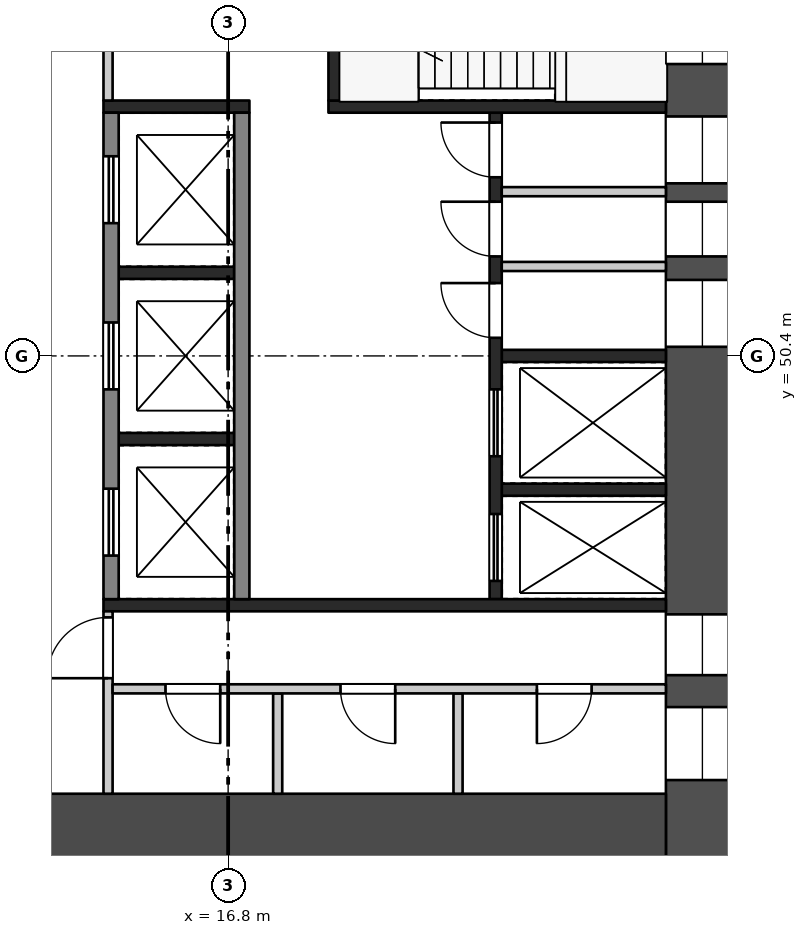
"""IFC4 building model, lengths in metres.
Left out: names, types, materials, properties, quantities, classifications, styles, units other than length and angle.
Written with IfcOpenShell. Run it as: python <this file> out.ifc"""

import sys

from ifc_helpers import new_model, si_unit, direction, frame, frame_2d, origin, place, context, subcontext, project, spatial, rectangle, extrude, element, fill, save


model = new_model("IFC4")
c1 = context("Model", 3, precision=1e-05, world=origin(), true_north=direction((0.0, 1.0)))
c2 = subcontext(c1, "Body", "Model", "MODEL_VIEW")
j1 = project(units=[si_unit("LENGTHUNIT", "METRE"), si_unit("PLANEANGLEUNIT", "RADIAN")], contexts=[c1])
p1 = place(None, origin())
s1 = spatial("IfcSite", under=j1, at=p1, CompositionType="ELEMENT")
p2 = place(p1, origin())
s2 = spatial("IfcBuilding", under=s1, at=p2, CompositionType="ELEMENT")
p3 = place(p2, frame((0.0, 0.0, 140.7)))
s3 = spatial("IfcBuildingStorey", under=s2, at=p3, CompositionType="ELEMENT", Elevation=140.7)
p4 = place(p3, frame((24.6, 58.8, 0.0), z_axis=(0.0, 0.0, 1.0), x_axis=(0.0, -1.0, 0.0)))
e1 = element("IfcWall", 1, at=p4, inside=s3, PredefinedType="SHEAR", context=c2, shape_type="SweptSolid", body=[
    extrude(rectangle(XDim=16.8, YDim=1.2, at=frame_2d((8.4, 0.0))), origin(), (0.0, 0.0, 1.0), 6.72),
])
p5 = place(p4, frame((1.8, 0.0, 0.5)))
e2 = element("IfcOpeningElement", 2, at=p5, cuts=e1, PredefinedType="OPENING", context=c2, shape_type="SweptSolid", body=[
    extrude(rectangle(XDim=1.8, YDim=2.4, at=frame_2d((0.9, 1.2))), frame((0.0, 0.61, 0.0), z_axis=(0.0, -1.0, 0.0), x_axis=(1.0, 0.0, 0.0)), (0.0, 0.0, 1.0), 1.22),
])
p6 = place(p4, frame((4.462, 0.0, 1.6)))
e3 = element("IfcOpeningElement", 3, at=p6, cuts=e1, PredefinedType="OPENING", context=c2, shape_type="SweptSolid", body=[
    extrude(rectangle(XDim=1.1, YDim=1.2, at=frame_2d((0.55, 0.6))), frame((0.0, 0.61, 0.0), z_axis=(0.0, -1.0, 0.0), x_axis=(1.0, 0.0, 0.0)), (0.0, 0.0, 1.0), 1.22),
])
p7 = place(p4, frame((5.864, 0.0, 1.6)))
e4 = element("IfcOpeningElement", 4, at=p7, cuts=e1, PredefinedType="OPENING", context=c2, shape_type="SweptSolid", body=[
    extrude(rectangle(XDim=0.9, YDim=1.2, at=frame_2d((0.45, 0.6))), frame((0.0, 0.61, 0.0), z_axis=(0.0, -1.0, 0.0), x_axis=(1.0, 0.0, 0.0)), (0.0, 0.0, 1.0), 1.22),
])
p8 = place(p4, frame((7.15, 0.0, 1.6)))
e5 = element("IfcOpeningElement", 5, at=p8, cuts=e1, PredefinedType="OPENING", context=c2, shape_type="SweptSolid", body=[
    extrude(rectangle(XDim=1.1, YDim=1.2, at=frame_2d((0.55, 0.6))), frame((0.0, 0.61, 0.0), z_axis=(0.0, -1.0, 0.0), x_axis=(1.0, 0.0, 0.0)), (0.0, 0.0, 1.0), 1.22),
])
p9 = place(p4, frame((12.65, 0.0, 0.6)))
e6 = element("IfcOpeningElement", 6, at=p9, cuts=e1, PredefinedType="OPENING", context=c2, shape_type="SweptSolid", body=[
    extrude(rectangle(XDim=1.0, YDim=2.1, at=frame_2d((0.5, 1.05))), frame((0.0, 0.61, 0.0), z_axis=(0.0, -1.0, 0.0), x_axis=(1.0, 0.0, 0.0)), (0.0, 0.0, 1.0), 1.22),
])
p10 = place(p4, frame((14.175, 0.0, 1.6)))
e7 = element("IfcOpeningElement", 7, at=p10, cuts=e1, PredefinedType="OPENING", context=c2, shape_type="SweptSolid", body=[
    extrude(rectangle(XDim=1.2, YDim=1.2, at=frame_2d((0.6, 0.6))), frame((0.0, 0.61, 0.0), z_axis=(0.0, -1.0, 0.0), x_axis=(1.0, 0.0, 0.0)), (0.0, 0.0, 1.0), 1.22),
])
p11 = place(p3, frame((9.6, 42.6, 0.0), z_axis=(0.0, 0.0, 1.0), x_axis=(1.0, 0.0, 0.0)))
e8 = element("IfcWall", 8, at=p11, inside=s3, PredefinedType="SHEAR", context=c2, shape_type="SweptSolid", body=[
    extrude(rectangle(XDim=14.4, YDim=1.2, at=frame_2d((7.2, 0.0))), origin(), (0.0, 0.0, 1.0), 6.72),
])
p12 = place(p11, frame((2.1, 0.0, 0.0)))
e9 = element("IfcOpeningElement", 9, at=p12, cuts=e8, PredefinedType="OPENING", context=c2, shape_type="SweptSolid", body=[
    extrude(rectangle(XDim=1.8, YDim=2.1, at=frame_2d((0.9, 1.05))), frame((0.0, 0.61, 0.0), z_axis=(0.0, -1.0, 0.0), x_axis=(1.0, 0.0, 0.0)), (0.0, 0.0, 1.0), 1.22),
])
for number, where, z_axis, x_axis in (
    (10, (15.0, 51.767, 0.0), (0.0, 0.0, 1.0), (1.0, 0.0, 0.0)),
    (11, (15.0, 49.033, 0.0), (0.0, 0.0, 1.0), (1.0, 0.0, 0.0)),
):
    element("IfcWall", number, at=place(p3, frame(where, z_axis=z_axis, x_axis=x_axis)), inside=s3, PredefinedType="SHEAR", context=c2, shape_type="SweptSolid", body=[
        extrude(rectangle(XDim=1.9, YDim=0.2, at=frame_2d((0.95, 0.0))), origin(), (0.0, 0.0, 1.0), 6.72),
    ])
p13 = place(p3, frame((14.875, 54.4, 0.0), z_axis=(0.0, 0.0, 1.0), x_axis=(0.0, -1.0, 0.0)))
e12 = element("IfcWall", 12, at=p13, inside=s3, PredefinedType="SHEAR", context=c2, shape_type="SweptSolid", body=[
    extrude(rectangle(XDim=8.0, YDim=0.25, at=frame_2d((4.0, 0.0))), origin(), (0.0, 0.0, 1.0), 6.72),
])
p14 = place(p13, frame((0.717, 0.0, 0.0)))
e13 = element("IfcOpeningElement", 13, at=p14, cuts=e12, PredefinedType="OPENING", context=c2, shape_type="SweptSolid", body=[
    extrude(rectangle(XDim=1.1, YDim=2.1, at=frame_2d((0.55, 1.05))), frame((0.0, 0.135, 0.0), z_axis=(0.0, -1.0, 0.0), x_axis=(1.0, 0.0, 0.0)), (0.0, 0.0, 1.0), 0.27),
])
p15 = place(p13, frame((3.45, 0.0, 0.0)))
e14 = element("IfcOpeningElement", 14, at=p15, cuts=e12, PredefinedType="OPENING", context=c2, shape_type="SweptSolid", body=[
    extrude(rectangle(XDim=1.1, YDim=2.1, at=frame_2d((0.55, 1.05))), frame((0.0, 0.135, 0.0), z_axis=(0.0, -1.0, 0.0), x_axis=(1.0, 0.0, 0.0)), (0.0, 0.0, 1.0), 0.27),
])
p16 = place(p13, frame((6.183, 0.0, 0.0)))
e15 = element("IfcOpeningElement", 15, at=p16, cuts=e12, PredefinedType="OPENING", context=c2, shape_type="SweptSolid", body=[
    extrude(rectangle(XDim=1.1, YDim=2.1, at=frame_2d((0.55, 1.05))), frame((0.0, 0.135, 0.0), z_axis=(0.0, -1.0, 0.0), x_axis=(1.0, 0.0, 0.0)), (0.0, 0.0, 1.0), 0.27),
])
p17 = place(p3, frame((17.025, 54.4, 0.0), z_axis=(0.0, 0.0, 1.0), x_axis=(0.0, -1.0, 0.0)))
e16 = element("IfcWall", 16, at=p17, inside=s3, PredefinedType="SHEAR", context=c2, shape_type="SweptSolid", body=[
    extrude(rectangle(XDim=8.0, YDim=0.25, at=frame_2d((4.0, 0.0))), origin(), (0.0, 0.0, 1.0), 6.72),
])
for number, where, z_axis, x_axis in (
    (17, (21.3, 50.4, 0.0), (0.0, 0.0, 1.0), (1.0, 0.0, 0.0)),
    (18, (21.3, 48.2, 0.0), (0.0, 0.0, 1.0), (1.0, 0.0, 0.0)),
):
    element("IfcWall", number, at=place(p3, frame(where, z_axis=z_axis, x_axis=x_axis)), inside=s3, PredefinedType="SHEAR", context=c2, shape_type="SweptSolid", body=[
        extrude(rectangle(XDim=2.7, YDim=0.2, at=frame_2d((1.35, 0.0))), origin(), (0.0, 0.0, 1.0), 6.72),
    ])
for number, where, z_axis, x_axis in (
    (19, (21.3, 53.101, 0.0), (0.0, 0.0, 1.0), (1.0, 0.0, 0.0)),
    (20, (21.3, 51.871, 0.0), (0.0, 0.0, 1.0), (1.0, 0.0, 0.0)),
):
    element("IfcWall", number, at=place(p3, frame(where, z_axis=z_axis, x_axis=x_axis)), inside=s3, PredefinedType="PARTITIONING", context=c2, shape_type="SweptSolid", body=[
        extrude(rectangle(XDim=2.7, YDim=0.15, at=frame_2d((1.35, 0.0))), origin(), (0.0, 0.0, 1.0), 6.72),
    ])
p18 = place(p3, frame((21.2, 54.4, 0.0), z_axis=(0.0, 0.0, 1.0), x_axis=(0.0, -1.0, 0.0)))
e21 = element("IfcWall", 21, at=p18, inside=s3, PredefinedType="SHEAR", context=c2, shape_type="SweptSolid", body=[
    extrude(rectangle(XDim=8.0, YDim=0.2, at=frame_2d((4.0, 0.0))), origin(), (0.0, 0.0, 1.0), 6.72),
])
p19 = place(p18, frame((0.162, 0.0, 0.0)))
e22 = element("IfcOpeningElement", 22, at=p19, cuts=e21, PredefinedType="OPENING", context=c2, shape_type="SweptSolid", body=[
    extrude(rectangle(XDim=0.9, YDim=2.1, at=frame_2d((0.45, 1.05))), frame((0.0, 0.11, 0.0), z_axis=(0.0, -1.0, 0.0), x_axis=(1.0, 0.0, 0.0)), (0.0, 0.0, 1.0), 0.22),
])
p20 = place(p18, frame((1.464, 0.0, 0.0)))
e23 = element("IfcOpeningElement", 23, at=p20, cuts=e21, PredefinedType="OPENING", context=c2, shape_type="SweptSolid", body=[
    extrude(rectangle(XDim=0.9, YDim=2.1, at=frame_2d((0.45, 1.05))), frame((0.0, 0.11, 0.0), z_axis=(0.0, -1.0, 0.0), x_axis=(1.0, 0.0, 0.0)), (0.0, 0.0, 1.0), 0.22),
])
p21 = place(p18, frame((2.802, 0.0, 0.0)))
e24 = element("IfcOpeningElement", 24, at=p21, cuts=e21, PredefinedType="OPENING", context=c2, shape_type="SweptSolid", body=[
    extrude(rectangle(XDim=0.9, YDim=2.1, at=frame_2d((0.45, 1.05))), frame((0.0, 0.11, 0.0), z_axis=(0.0, -1.0, 0.0), x_axis=(1.0, 0.0, 0.0)), (0.0, 0.0, 1.0), 0.22),
])
p22 = place(p18, frame((4.55, 0.0, 0.0)))
e25 = element("IfcOpeningElement", 25, at=p22, cuts=e21, PredefinedType="OPENING", context=c2, shape_type="SweptSolid", body=[
    extrude(rectangle(XDim=1.1, YDim=2.1, at=frame_2d((0.55, 1.05))), frame((0.0, 0.11, 0.0), z_axis=(0.0, -1.0, 0.0), x_axis=(1.0, 0.0, 0.0)), (0.0, 0.0, 1.0), 0.22),
])
p23 = place(p18, frame((6.6, 0.0, 0.0)))
e26 = element("IfcOpeningElement", 26, at=p23, cuts=e21, PredefinedType="OPENING", context=c2, shape_type="SweptSolid", body=[
    extrude(rectangle(XDim=1.1, YDim=2.1, at=frame_2d((0.55, 1.05))), frame((0.0, 0.11, 0.0), z_axis=(0.0, -1.0, 0.0), x_axis=(1.0, 0.0, 0.0)), (0.0, 0.0, 1.0), 0.22),
])
p24 = place(p3, frame((14.75, 54.5, 0.0), z_axis=(0.0, 0.0, 1.0), x_axis=(1.0, 0.0, 0.0)))
e27 = element("IfcWall", 27, at=p24, inside=s3, PredefinedType="SHEAR", context=c2, shape_type="SweptSolid", body=[
    extrude(rectangle(XDim=2.4, YDim=0.2, at=frame_2d((1.2, 0.0))), origin(), (0.0, 0.0, 1.0), 6.72),
])
p25 = place(p3, frame((18.45, 54.5, 0.0), z_axis=(0.0, 0.0, 1.0), x_axis=(1.0, 0.0, 0.0)))
e28 = element("IfcWall", 28, at=p25, inside=s3, PredefinedType="SHEAR", context=c2, shape_type="SweptSolid", body=[
    extrude(rectangle(XDim=5.55, YDim=0.2, at=frame_2d((2.775, 0.0))), origin(), (0.0, 0.0, 1.0), 6.72),
])
p26 = place(p3, frame((14.825, 57.6, 0.0), z_axis=(0.0, 0.0, 1.0), x_axis=(0.0, -1.0, 0.0)))
e29 = element("IfcWall", 29, at=p26, inside=s3, PredefinedType="PARTITIONING", context=c2, shape_type="SweptSolid", body=[
    extrude(rectangle(XDim=3.0, YDim=0.15, at=frame_2d((1.5, 0.0))), origin(), (0.0, 0.0, 1.0), 6.72),
])
p27 = place(p26, frame((1.0, 0.0, 0.0)))
e30 = element("IfcOpeningElement", 30, at=p27, cuts=e29, PredefinedType="OPENING", context=c2, shape_type="SweptSolid", body=[
    extrude(rectangle(XDim=1.0, YDim=2.1, at=frame_2d((0.5, 1.05))), frame((0.0, 0.085, 0.0), z_axis=(0.0, -1.0, 0.0), x_axis=(1.0, 0.0, 0.0)), (0.0, 0.0, 1.0), 0.17),
])
p28 = place(p3, frame((18.55, 57.6, 0.0), z_axis=(0.0, 0.0, 1.0), x_axis=(0.0, -1.0, 0.0)))
e31 = element("IfcWall", 31, at=p28, inside=s3, PredefinedType="SHEAR", context=c2, shape_type="SweptSolid", body=[
    extrude(rectangle(XDim=3.0, YDim=0.2, at=frame_2d((1.5, 0.0))), origin(), (0.0, 0.0, 1.0), 6.72),
])
p29 = place(p28, frame((1.0, 0.0, 0.0)))
e32 = element("IfcOpeningElement", 32, at=p29, cuts=e31, PredefinedType="OPENING", context=c2, shape_type="SweptSolid", body=[
    extrude(rectangle(XDim=1.0, YDim=2.1, at=frame_2d((0.5, 1.05))), frame((0.0, 0.11, 0.0), z_axis=(0.0, -1.0, 0.0), x_axis=(1.0, 0.0, 0.0)), (0.0, 0.0, 1.0), 0.22),
])
p30 = place(p3, frame((14.75, 46.3, 0.0), z_axis=(0.0, 0.0, 1.0), x_axis=(1.0, 0.0, 0.0)))
e33 = element("IfcWall", 33, at=p30, inside=s3, PredefinedType="SHEAR", context=c2, shape_type="SweptSolid", body=[
    extrude(rectangle(XDim=9.25, YDim=0.2, at=frame_2d((4.625, 0.0))), origin(), (0.0, 0.0, 1.0), 6.72),
])
p31 = place(p3, frame((14.825, 46.2, 0.0), z_axis=(0.0, 0.0, 1.0), x_axis=(0.0, -1.0, 0.0)))
e34 = element("IfcWall", 34, at=p31, inside=s3, PredefinedType="PARTITIONING", context=c2, shape_type="SweptSolid", body=[
    extrude(rectangle(XDim=3.0, YDim=0.15, at=frame_2d((1.5, 0.0))), origin(), (0.0, 0.0, 1.0), 6.72),
])
p32 = place(p31, frame((0.1, 0.0, 0.0)))
e35 = element("IfcOpeningElement", 35, at=p32, cuts=e34, PredefinedType="OPENING", context=c2, shape_type="SweptSolid", body=[
    extrude(rectangle(XDim=1.0, YDim=2.1, at=frame_2d((0.5, 1.05))), frame((0.0, 0.085, 0.0), z_axis=(0.0, -1.0, 0.0), x_axis=(1.0, 0.0, 0.0)), (0.0, 0.0, 1.0), 0.17),
])
for number, where, z_axis, x_axis in (
    (36, (17.615, 44.85, 0.0), (0.0, 0.0, 1.0), (0.0, -1.0, 0.0)),
    (37, (20.581, 44.85, 0.0), (0.0, 0.0, 1.0), (0.0, -1.0, 0.0)),
):
    element("IfcWall", number, at=place(p3, frame(where, z_axis=z_axis, x_axis=x_axis)), inside=s3, PredefinedType="PARTITIONING", context=c2, shape_type="SweptSolid", body=[
        extrude(rectangle(XDim=1.65, YDim=0.15, at=frame_2d((0.825, 0.0))), origin(), (0.0, 0.0, 1.0), 6.72),
    ])
p33 = place(p3, frame((14.9, 44.925, 0.0), z_axis=(0.0, 0.0, 1.0), x_axis=(1.0, 0.0, 0.0)))
e38 = element("IfcWall", 38, at=p33, inside=s3, PredefinedType="PARTITIONING", context=c2, shape_type="SweptSolid", body=[
    extrude(rectangle(XDim=9.1, YDim=0.15, at=frame_2d((4.55, 0.0))), origin(), (0.0, 0.0, 1.0), 6.72),
])
p34 = place(p33, frame((0.87, 0.0, 0.0)))
e39 = element("IfcOpeningElement", 39, at=p34, cuts=e38, PredefinedType="OPENING", context=c2, shape_type="SweptSolid", body=[
    extrude(rectangle(XDim=0.9, YDim=2.1, at=frame_2d((0.45, 1.05))), frame((0.0, 0.085, 0.0), z_axis=(0.0, -1.0, 0.0), x_axis=(1.0, 0.0, 0.0)), (0.0, 0.0, 1.0), 0.17),
])
p35 = place(p33, frame((3.748, 0.0, 0.0)))
e40 = element("IfcOpeningElement", 40, at=p35, cuts=e38, PredefinedType="OPENING", context=c2, shape_type="SweptSolid", body=[
    extrude(rectangle(XDim=0.9, YDim=2.1, at=frame_2d((0.45, 1.05))), frame((0.0, 0.085, 0.0), z_axis=(0.0, -1.0, 0.0), x_axis=(1.0, 0.0, 0.0)), (0.0, 0.0, 1.0), 0.17),
])
p36 = place(p33, frame((6.978, 0.0, 0.0)))
e41 = element("IfcOpeningElement", 41, at=p36, cuts=e38, PredefinedType="OPENING", context=c2, shape_type="SweptSolid", body=[
    extrude(rectangle(XDim=0.9, YDim=2.1, at=frame_2d((0.45, 1.05))), frame((0.0, 0.085, 0.0), z_axis=(0.0, -1.0, 0.0), x_axis=(1.0, 0.0, 0.0)), (0.0, 0.0, 1.0), 0.17),
])
p37 = place(p14, origin())
e42 = element("IfcDoor", 42, at=p37, inside=s3, OperationType="DOUBLE_DOOR_SLIDING", PredefinedType="DOOR", context=c2, shape_type="SweptSolid", body=[
    extrude(rectangle(XDim=1.1, YDim=2.1, at=frame_2d((0.55, 1.05))), frame((0.0, 0.025, 0.0), z_axis=(0.0, -1.0, 0.0), x_axis=(1.0, 0.0, 0.0)), (0.0, 0.0, 1.0), 0.05),
])
fill(e13, e42)
p38 = place(p15, origin())
e43 = element("IfcDoor", 43, at=p38, inside=s3, OperationType="DOUBLE_DOOR_SLIDING", PredefinedType="DOOR", context=c2, shape_type="SweptSolid", body=[
    extrude(rectangle(XDim=1.1, YDim=2.1, at=frame_2d((0.55, 1.05))), frame((0.0, 0.025, 0.0), z_axis=(0.0, -1.0, 0.0), x_axis=(1.0, 0.0, 0.0)), (0.0, 0.0, 1.0), 0.05),
])
fill(e14, e43)
p39 = place(p16, origin())
e44 = element("IfcDoor", 44, at=p39, inside=s3, OperationType="DOUBLE_DOOR_SLIDING", PredefinedType="DOOR", context=c2, shape_type="SweptSolid", body=[
    extrude(rectangle(XDim=1.1, YDim=2.1, at=frame_2d((0.55, 1.05))), frame((0.0, 0.025, 0.0), z_axis=(0.0, -1.0, 0.0), x_axis=(1.0, 0.0, 0.0)), (0.0, 0.0, 1.0), 0.05),
])
fill(e15, e44)
p40 = place(p19, frame((0.9, 0.0, 0.0), z_axis=(0.0, 0.0, 1.0), x_axis=(-1.0, 0.0, 0.0)))
e45 = element("IfcDoor", 45, at=p40, inside=s3, OperationType="SINGLE_SWING_RIGHT", PredefinedType="DOOR", context=c2, shape_type="SweptSolid", body=[
    extrude(rectangle(XDim=0.9, YDim=2.1, at=frame_2d((0.45, 1.05))), frame((0.0, 0.025, 0.0), z_axis=(0.0, -1.0, 0.0), x_axis=(1.0, 0.0, 0.0)), (0.0, 0.0, 1.0), 0.05),
])
fill(e22, e45)
p41 = place(p20, frame((0.9, 0.0, 0.0), z_axis=(0.0, 0.0, 1.0), x_axis=(-1.0, 0.0, 0.0)))
e46 = element("IfcDoor", 46, at=p41, inside=s3, OperationType="SINGLE_SWING_RIGHT", PredefinedType="DOOR", context=c2, shape_type="SweptSolid", body=[
    extrude(rectangle(XDim=0.9, YDim=2.1, at=frame_2d((0.45, 1.05))), frame((0.0, 0.025, 0.0), z_axis=(0.0, -1.0, 0.0), x_axis=(1.0, 0.0, 0.0)), (0.0, 0.0, 1.0), 0.05),
])
fill(e23, e46)
p42 = place(p21, frame((0.9, 0.0, 0.0), z_axis=(0.0, 0.0, 1.0), x_axis=(-1.0, 0.0, 0.0)))
e47 = element("IfcDoor", 47, at=p42, inside=s3, OperationType="SINGLE_SWING_RIGHT", PredefinedType="DOOR", context=c2, shape_type="SweptSolid", body=[
    extrude(rectangle(XDim=0.9, YDim=2.1, at=frame_2d((0.45, 1.05))), frame((0.0, 0.025, 0.0), z_axis=(0.0, -1.0, 0.0), x_axis=(1.0, 0.0, 0.0)), (0.0, 0.0, 1.0), 0.05),
])
fill(e24, e47)
p43 = place(p22, origin())
e48 = element("IfcDoor", 48, at=p43, inside=s3, OperationType="DOUBLE_DOOR_SLIDING", PredefinedType="DOOR", context=c2, shape_type="SweptSolid", body=[
    extrude(rectangle(XDim=1.1, YDim=2.1, at=frame_2d((0.55, 1.05))), frame((0.0, 0.025, 0.0), z_axis=(0.0, -1.0, 0.0), x_axis=(1.0, 0.0, 0.0)), (0.0, 0.0, 1.0), 0.05),
])
fill(e25, e48)
p44 = place(p23, origin())
e49 = element("IfcDoor", 49, at=p44, inside=s3, OperationType="DOUBLE_DOOR_SLIDING", PredefinedType="DOOR", context=c2, shape_type="SweptSolid", body=[
    extrude(rectangle(XDim=1.1, YDim=2.1, at=frame_2d((0.55, 1.05))), frame((0.0, 0.025, 0.0), z_axis=(0.0, -1.0, 0.0), x_axis=(1.0, 0.0, 0.0)), (0.0, 0.0, 1.0), 0.05),
])
fill(e26, e49)
p45 = place(p32, frame((1.0, 0.0, 0.0), z_axis=(0.0, 0.0, 1.0), x_axis=(-1.0, 0.0, 0.0)))
e50 = element("IfcDoor", 50, at=p45, inside=s3, OperationType="SINGLE_SWING_LEFT", PredefinedType="DOOR", context=c2, shape_type="SweptSolid", body=[
    extrude(rectangle(XDim=1.0, YDim=2.1, at=frame_2d((0.5, 1.05))), frame((0.0, 0.025, 0.0), z_axis=(0.0, -1.0, 0.0), x_axis=(1.0, 0.0, 0.0)), (0.0, 0.0, 1.0), 0.05),
])
fill(e35, e50)
p46 = place(p34, frame((0.9, 0.0, 0.0), z_axis=(0.0, 0.0, 1.0), x_axis=(-1.0, 0.0, 0.0)))
e51 = element("IfcDoor", 51, at=p46, inside=s3, OperationType="SINGLE_SWING_LEFT", PredefinedType="DOOR", context=c2, shape_type="SweptSolid", body=[
    extrude(rectangle(XDim=0.9, YDim=2.1, at=frame_2d((0.45, 1.05))), frame((0.0, 0.025, 0.0), z_axis=(0.0, -1.0, 0.0), x_axis=(1.0, 0.0, 0.0)), (0.0, 0.0, 1.0), 0.05),
])
fill(e39, e51)
p47 = place(p35, frame((0.9, 0.0, 0.0), z_axis=(0.0, 0.0, 1.0), x_axis=(-1.0, 0.0, 0.0)))
e52 = element("IfcDoor", 52, at=p47, inside=s3, OperationType="SINGLE_SWING_LEFT", PredefinedType="DOOR", context=c2, shape_type="SweptSolid", body=[
    extrude(rectangle(XDim=0.9, YDim=2.1, at=frame_2d((0.45, 1.05))), frame((0.0, 0.025, 0.0), z_axis=(0.0, -1.0, 0.0), x_axis=(1.0, 0.0, 0.0)), (0.0, 0.0, 1.0), 0.05),
])
fill(e40, e52)
p48 = place(p36, frame((0.9, 0.0, 0.0), z_axis=(0.0, 0.0, 1.0), x_axis=(-1.0, 0.0, 0.0)))
e53 = element("IfcDoor", 53, at=p48, inside=s3, OperationType="SINGLE_SWING_RIGHT", PredefinedType="DOOR", context=c2, shape_type="SweptSolid", body=[
    extrude(rectangle(XDim=0.9, YDim=2.1, at=frame_2d((0.45, 1.05))), frame((0.0, 0.025, 0.0), z_axis=(0.0, -1.0, 0.0), x_axis=(1.0, 0.0, 0.0)), (0.0, 0.0, 1.0), 0.05),
])
fill(e41, e53)
p49 = place(p5, origin())
e54 = element("IfcWindow", 54, at=p49, inside=s3, PartitioningType="SINGLE_PANEL", PredefinedType="WINDOW", context=c2, shape_type="SweptSolid", body=[
    extrude(rectangle(XDim=1.8, YDim=2.4, at=frame_2d((0.9, 1.2))), frame((0.0, 0.03, 0.0), z_axis=(0.0, -1.0, 0.0), x_axis=(1.0, 0.0, 0.0)), (0.0, 0.0, 1.0), 0.06),
])
fill(e2, e54)
p50 = place(p6, origin())
e55 = element("IfcWindow", 55, at=p50, inside=s3, PartitioningType="SINGLE_PANEL", PredefinedType="WINDOW", context=c2, shape_type="SweptSolid", body=[
    extrude(rectangle(XDim=1.1, YDim=1.2, at=frame_2d((0.55, 0.6))), frame((0.0, 0.03, 0.0), z_axis=(0.0, -1.0, 0.0), x_axis=(1.0, 0.0, 0.0)), (0.0, 0.0, 1.0), 0.06),
])
fill(e3, e55)
p51 = place(p7, origin())
e56 = element("IfcWindow", 56, at=p51, inside=s3, PartitioningType="SINGLE_PANEL", PredefinedType="WINDOW", context=c2, shape_type="SweptSolid", body=[
    extrude(rectangle(XDim=0.9, YDim=1.2, at=frame_2d((0.45, 0.6))), frame((0.0, 0.03, 0.0), z_axis=(0.0, -1.0, 0.0), x_axis=(1.0, 0.0, 0.0)), (0.0, 0.0, 1.0), 0.06),
])
fill(e4, e56)
p52 = place(p8, origin())
e57 = element("IfcWindow", 57, at=p52, inside=s3, PartitioningType="SINGLE_PANEL", PredefinedType="WINDOW", context=c2, shape_type="SweptSolid", body=[
    extrude(rectangle(XDim=1.1, YDim=1.2, at=frame_2d((0.55, 0.6))), frame((0.0, 0.03, 0.0), z_axis=(0.0, -1.0, 0.0), x_axis=(1.0, 0.0, 0.0)), (0.0, 0.0, 1.0), 0.06),
])
fill(e5, e57)
p53 = place(p9, origin())
e58 = element("IfcWindow", 58, at=p53, inside=s3, PartitioningType="SINGLE_PANEL", PredefinedType="WINDOW", context=c2, shape_type="SweptSolid", body=[
    extrude(rectangle(XDim=1.0, YDim=2.1, at=frame_2d((0.5, 1.05))), frame((0.0, 0.03, 0.0), z_axis=(0.0, -1.0, 0.0), x_axis=(1.0, 0.0, 0.0)), (0.0, 0.0, 1.0), 0.06),
])
fill(e6, e58)
p54 = place(p10, origin())
e59 = element("IfcWindow", 59, at=p54, inside=s3, PartitioningType="SINGLE_PANEL", PredefinedType="WINDOW", context=c2, shape_type="SweptSolid", body=[
    extrude(rectangle(XDim=1.2, YDim=1.2, at=frame_2d((0.6, 0.6))), frame((0.0, 0.03, 0.0), z_axis=(0.0, -1.0, 0.0), x_axis=(1.0, 0.0, 0.0)), (0.0, 0.0, 1.0), 0.06),
])
fill(e7, e59)
save(model, sys.argv[1])
